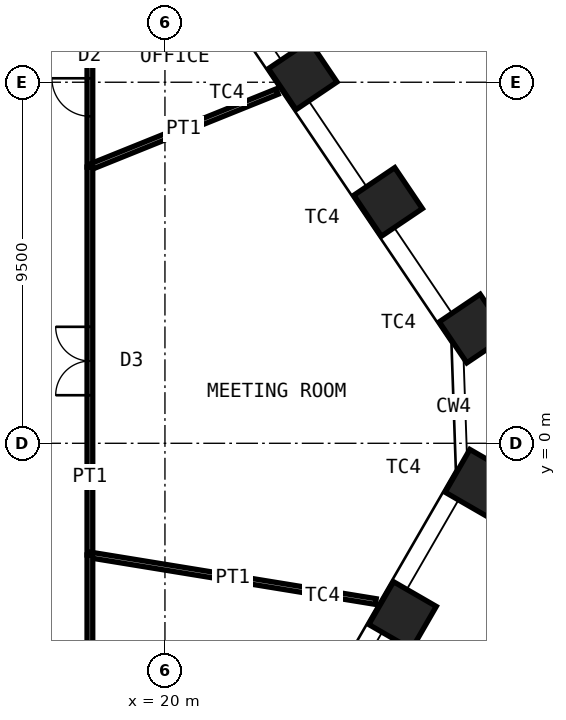
"""IFC4 building model, lengths in metres.
Left out: names, types, materials, properties, quantities, classifications, styles, units other than length and angle.
Written with IfcOpenShell. Run it as: python <this file> out.ifc"""

import sys

from ifc_helpers import new_model, si_unit, direction, frame, frame_2d, origin, origin_2d, place, context, subcontext, project, spatial, rectangle, hollow_rectangle, extrude, element, fill, save


model = new_model("IFC4")
c1 = context("Model", 3, precision=1e-05, world=origin(), true_north=direction((0.0, 1.0)))
c2 = subcontext(c1, "Body", "Model", "MODEL_VIEW")
j1 = project(units=[si_unit("LENGTHUNIT", "METRE"), si_unit("PLANEANGLEUNIT", "RADIAN")], contexts=[c1])
p1 = place(None, origin())
s1 = spatial("IfcSite", under=j1, at=p1, CompositionType="ELEMENT")
p2 = place(p1, origin())
s2 = spatial("IfcBuilding", under=s1, at=p2, CompositionType="ELEMENT")
p3 = place(p2, frame((0.0, 0.0, 157.6)))
s3 = spatial("IfcBuildingStorey", under=s2, at=p3, CompositionType="ELEMENT", Elevation=157.6)
for number, where, z_axis, x_axis in (
    (1, (23.625, 9.682, 0.0), (0.0, 0.0, 1.0), (-0.559, 0.829, 0.0)),
    (2, (25.872, 6.351, 0.0), (0.0, 0.0, 1.0), (-0.559, 0.829, 0.0)),
    (3, (28.119, 3.019, 0.0), (0.0, 0.0, 1.0), (-0.559, 0.829, 0.0)),
    (4, (28.261, -1.05, 0.0), (0.0, 0.0, 1.0), (0.5, 0.866, 0.0)),
    (5, (26.252, -4.53, 0.0), (0.0, 0.0, 1.0), (0.5, 0.866, 0.0)),
):
    element("IfcColumn", number, at=place(p3, frame(where, z_axis=z_axis, x_axis=x_axis)), inside=s3, PredefinedType="COLUMN", context=c2, shape_type="SweptSolid", body=[
        extrude(hollow_rectangle(XDim=1.3, YDim=1.3, WallThickness=0.1, at=origin_2d()), origin(), (0.0, 0.0, 1.0), 4.2),
    ])
p4 = place(p3, frame((18.025, 10.941, 0.0), z_axis=(0.0, 0.0, 1.0), x_axis=(0.0, -1.0, 0.0)))
e6 = element("IfcWall", 6, at=p4, inside=s3, PredefinedType="PARTITIONING", context=c2, shape_type="SweptSolid", body=[
    extrude(rectangle(XDim=3.673, YDim=0.15, at=frame_2d((1.837, 0.0))), origin(), (0.0, 0.0, 1.0), 4.03),
])
p5 = place(p4, frame((1.337, 0.0, 0.0)))
e7 = element("IfcOpeningElement", 7, at=p5, cuts=e6, PredefinedType="OPENING", context=c2, shape_type="SweptSolid", body=[
    extrude(rectangle(XDim=1.0, YDim=2.4, at=frame_2d((0.5, 1.2))), frame((0.0, 0.085, 0.0), z_axis=(0.0, -1.0, 0.0), x_axis=(1.0, 0.0, 0.0)), (0.0, 0.0, 1.0), 0.17),
])
p6 = place(p3, frame((22.951, 9.254, 0.0), z_axis=(0.0, 0.0, 1.0), x_axis=(-0.927452527427, -0.37394091695, 0.0)))
e8 = element("IfcWall", 8, at=p6, inside=s3, PredefinedType="PARTITIONING", context=c2, shape_type="SweptSolid", body=[
    extrude(rectangle(XDim=5.312, YDim=0.15, at=frame_2d((2.656, 0.0))), origin(), (0.0, 0.0, 1.0), 3.33),
])
p7 = place(p3, frame((18.025, 7.267, 0.0), z_axis=(0.0, 0.0, 1.0), x_axis=(0.0, -1.0, 0.0)))
e9 = element("IfcWall", 9, at=p7, inside=s3, PredefinedType="PARTITIONING", context=c2, shape_type="SweptSolid", body=[
    extrude(rectangle(XDim=10.205, YDim=0.15, at=frame_2d((5.103, 0.0))), origin(), (0.0, 0.0, 1.0), 4.03),
])
p8 = place(p7, frame((4.203, 0.0, 0.0)))
e10 = element("IfcOpeningElement", 10, at=p8, cuts=e9, PredefinedType="OPENING", context=c2, shape_type="SweptSolid", body=[
    extrude(rectangle(XDim=1.8, YDim=2.4, at=frame_2d((0.9, 1.2))), frame((0.0, 0.085, 0.0), z_axis=(0.0, -1.0, 0.0), x_axis=(1.0, 0.0, 0.0)), (0.0, 0.0, 1.0), 0.17),
])
p9 = place(p3, frame((25.547, -4.164, 0.0), z_axis=(0.0, 0.0, 1.0), x_axis=(-0.986975470567, 0.160870819291, 0.0)))
e11 = element("IfcWall", 11, at=p9, inside=s3, PredefinedType="PARTITIONING", context=c2, shape_type="SweptSolid", body=[
    extrude(rectangle(XDim=7.622, YDim=0.15, at=frame_2d((3.811, 0.0))), origin(), (0.0, 0.0, 1.0), 4.03),
])
p10 = place(p3, frame((18.025, -2.938, 0.0), z_axis=(0.0, 0.0, 1.0), x_axis=(0.0, -1.0, 0.0)))
e12 = element("IfcWall", 12, at=p10, inside=s3, PredefinedType="PARTITIONING", context=c2, shape_type="SweptSolid", body=[
    extrude(rectangle(XDim=8.687, YDim=0.15, at=frame_2d((4.344, 0.0))), origin(), (0.0, 0.0, 1.0), 4.03),
])
p11 = place(p10, frame((3.443, 0.0, 0.0)))
e13 = element("IfcOpeningElement", 13, at=p11, cuts=e12, PredefinedType="OPENING", context=c2, shape_type="SweptSolid", body=[
    extrude(rectangle(XDim=1.8, YDim=2.4, at=frame_2d((0.9, 1.2))), frame((0.0, 0.085, 0.0), z_axis=(0.0, -1.0, 0.0), x_axis=(1.0, 0.0, 0.0)), (0.0, 0.0, 1.0), 0.17),
])
p12 = place(p5, origin())
e14 = element("IfcDoor", 14, at=p12, inside=s3, OperationType="SINGLE_SWING_LEFT", PredefinedType="DOOR", context=c2, shape_type="SweptSolid", body=[
    extrude(rectangle(XDim=1.0, YDim=2.4, at=frame_2d((0.5, 1.2))), frame((0.0, 0.025, 0.0), z_axis=(0.0, -1.0, 0.0), x_axis=(1.0, 0.0, 0.0)), (0.0, 0.0, 1.0), 0.05),
])
fill(e7, e14)
p13 = place(p8, origin())
e15 = element("IfcDoor", 15, at=p13, inside=s3, OperationType="DOUBLE_DOOR_DOUBLE_SWING", PredefinedType="DOOR", context=c2, shape_type="SweptSolid", body=[
    extrude(rectangle(XDim=1.8, YDim=2.4, at=frame_2d((0.9, 1.2))), frame((0.0, 0.025, 0.0), z_axis=(0.0, -1.0, 0.0), x_axis=(1.0, 0.0, 0.0)), (0.0, 0.0, 1.0), 0.05),
])
fill(e10, e15)
save(model, sys.argv[1])
